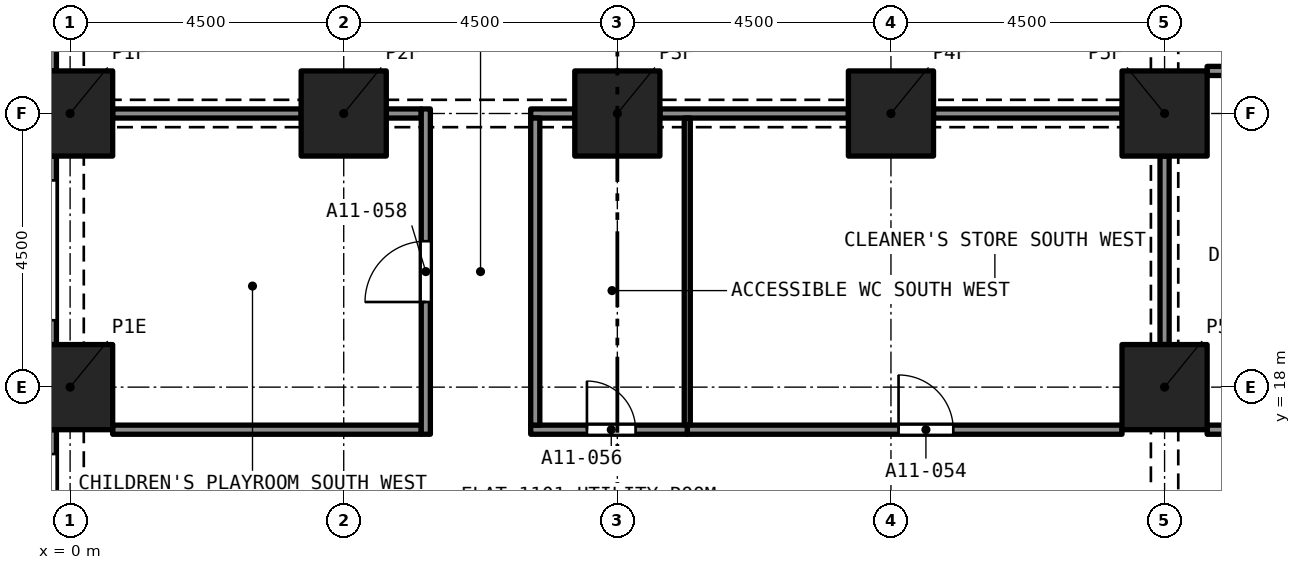
"""IFC4 building model, lengths in metres.
Left out: names, types, materials, properties, quantities, classifications, styles, units other than length and angle.
Written with IfcOpenShell. Run it as: python <this file> out.ifc"""

import sys

from ifc_helpers import new_model, si_unit, direction, frame, frame_2d, origin, origin_2d, place, context, subcontext, project, spatial, rectangle, extrude, element, fill, save


model = new_model("IFC4")
c1 = context("Model", 3, precision=1e-05, world=origin(), true_north=direction((0.0, 1.0)))
c2 = subcontext(c1, "Body", "Model", "MODEL_VIEW")
j1 = project(units=[si_unit("LENGTHUNIT", "METRE"), si_unit("PLANEANGLEUNIT", "RADIAN")], contexts=[c1])
p1 = place(None, origin())
s1 = spatial("IfcSite", under=j1, at=p1, CompositionType="ELEMENT")
p2 = place(p1, origin())
s2 = spatial("IfcBuilding", under=s1, at=p2, CompositionType="ELEMENT")
p3 = place(p2, frame((0.0, 0.0, 46.4)))
s3 = spatial("IfcBuildingStorey", under=s2, at=p3, CompositionType="ELEMENT", Elevation=46.4)
for number, where, z_axis, x_axis in (
    (1, (0.0, 18.0, 0.0), (0.0, 0.0, 1.0), (1.0, 0.0, 0.0)),
    (2, (18.0, 18.0, 0.0), (0.0, 0.0, 1.0), (1.0, 0.0, 0.0)),
    (3, (0.0, 22.5, 0.0), (0.0, 0.0, 1.0), (1.0, 0.0, 0.0)),
    (4, (4.5, 22.5, 0.0), (0.0, 0.0, 1.0), (1.0, 0.0, 0.0)),
    (5, (9.0, 22.5, 0.0), (0.0, 0.0, 1.0), (1.0, 0.0, 0.0)),
    (6, (13.5, 22.5, 0.0), (0.0, 0.0, 1.0), (1.0, 0.0, 0.0)),
    (7, (18.0, 22.5, 0.0), (0.0, 0.0, 1.0), (1.0, 0.0, 0.0)),
):
    element("IfcColumn", number, at=place(p3, frame(where, z_axis=z_axis, x_axis=x_axis)), inside=s3, PredefinedType="COLUMN", context=c2, shape_type="SweptSolid", body=[
        extrude(rectangle(XDim=1.4, YDim=1.4, at=origin_2d()), origin(), (0.0, 0.0, 1.0), 3.2),
    ])
p4 = place(p3, frame((-0.375, 23.2, 0.0), z_axis=(0.0, 0.0, 1.0), x_axis=(0.0, 1.0, 0.0)))
e8 = element("IfcWall", 8, at=p4, inside=s3, PredefinedType="SOLIDWALL", context=c2, shape_type="SweptSolid", body=[
    extrude(rectangle(XDim=3.1, YDim=0.3, at=frame_2d((1.55, 0.0))), origin(), (0.0, 0.0, 1.0), 3.2),
])
p5 = place(p4, frame((0.4, 0.0, 0.45)))
e9 = element("IfcOpeningElement", 9, at=p5, cuts=e8, PredefinedType="OPENING", context=c2, shape_type="SweptSolid", body=[
    extrude(rectangle(XDim=2.3, YDim=1.95, at=frame_2d((1.15, 0.975))), frame((0.0, 0.16, 0.0), z_axis=(0.0, -1.0, 0.0), x_axis=(1.0, 0.0, 0.0)), (0.0, 0.0, 1.0), 0.32),
])
p6 = place(p3, frame((-0.375, 18.7, 0.0), z_axis=(0.0, 0.0, 1.0), x_axis=(0.0, 1.0, 0.0)))
e10 = element("IfcWall", 10, at=p6, inside=s3, PredefinedType="SOLIDWALL", context=c2, shape_type="SweptSolid", body=[
    extrude(rectangle(XDim=3.1, YDim=0.3, at=frame_2d((1.55, 0.0))), origin(), (0.0, 0.0, 1.0), 3.2),
])
p7 = place(p6, frame((0.4, 0.0, 0.45)))
e11 = element("IfcOpeningElement", 11, at=p7, cuts=e10, PredefinedType="OPENING", context=c2, shape_type="SweptSolid", body=[
    extrude(rectangle(XDim=2.3, YDim=1.95, at=frame_2d((1.15, 0.975))), frame((0.0, 0.16, 0.0), z_axis=(0.0, -1.0, 0.0), x_axis=(1.0, 0.0, 0.0)), (0.0, 0.0, 1.0), 0.32),
])
p8 = place(p3, frame((-0.375, 14.2, 0.0), z_axis=(0.0, 0.0, 1.0), x_axis=(0.0, 1.0, 0.0)))
e12 = element("IfcWall", 12, at=p8, inside=s3, PredefinedType="SOLIDWALL", context=c2, shape_type="SweptSolid", body=[
    extrude(rectangle(XDim=3.1, YDim=0.3, at=frame_2d((1.55, 0.0))), origin(), (0.0, 0.0, 1.0), 3.2),
])
p9 = place(p8, frame((0.4, 0.0, 0.45)))
e13 = element("IfcOpeningElement", 13, at=p9, cuts=e12, PredefinedType="OPENING", context=c2, shape_type="SweptSolid", body=[
    extrude(rectangle(XDim=2.3, YDim=1.95, at=frame_2d((1.15, 0.975))), frame((0.0, 0.16, 0.0), z_axis=(0.0, -1.0, 0.0), x_axis=(1.0, 0.0, 0.0)), (0.0, 0.0, 1.0), 0.32),
])
p10 = place(p3, frame((18.7, 17.3, 0.0), z_axis=(0.0, 0.0, 1.0), x_axis=(1.0, 0.0, 0.0)))
e14 = element("IfcWall", 14, at=p10, inside=s3, PredefinedType="PARTITIONING", context=c2, shape_type="SweptSolid", body=[
    extrude(rectangle(XDim=5.075, YDim=0.15, at=frame_2d((2.538, 0.0))), origin(), (0.0, 0.0, 1.0), 2.75),
])
p11 = place(p3, frame((10.15, 17.3, 0.0), z_axis=(0.0, 0.0, 1.0), x_axis=(1.0, 0.0, 0.0)))
e15 = element("IfcWall", 15, at=p11, inside=s3, PredefinedType="PARTITIONING", context=c2, shape_type="SweptSolid", body=[
    extrude(rectangle(XDim=7.15, YDim=0.15, at=frame_2d((3.575, 0.0))), origin(), (0.0, 0.0, 1.0), 2.9),
])
p12 = place(p11, frame((3.475, 0.0, 0.0)))
e16 = element("IfcOpeningElement", 16, at=p12, cuts=e15, PredefinedType="OPENING", context=c2, shape_type="SweptSolid", body=[
    extrude(rectangle(XDim=0.9, YDim=2.1, at=frame_2d((0.45, 1.05))), frame((0.0, 0.085, 0.0), z_axis=(0.0, -1.0, 0.0), x_axis=(1.0, 0.0, 0.0)), (0.0, 0.0, 1.0), 0.17),
])
p13 = place(p3, frame((7.575, 17.3, 0.0), z_axis=(0.0, 0.0, 1.0), x_axis=(1.0, 0.0, 0.0)))
e17 = element("IfcWall", 17, at=p13, inside=s3, PredefinedType="PARTITIONING", context=c2, shape_type="SweptSolid", body=[
    extrude(rectangle(XDim=2.575, YDim=0.15, at=frame_2d((1.288, 0.0))), origin(), (0.0, 0.0, 1.0), 2.9),
])
p14 = place(p13, frame((0.925, 0.0, 0.0)))
e18 = element("IfcOpeningElement", 18, at=p14, cuts=e17, PredefinedType="OPENING", context=c2, shape_type="SweptSolid", body=[
    extrude(rectangle(XDim=0.8, YDim=2.1, at=frame_2d((0.4, 1.05))), frame((0.0, 0.085, 0.0), z_axis=(0.0, -1.0, 0.0), x_axis=(1.0, 0.0, 0.0)), (0.0, 0.0, 1.0), 0.17),
])
p15 = place(p3, frame((0.7, 17.3, 0.0), z_axis=(0.0, 0.0, 1.0), x_axis=(1.0, 0.0, 0.0)))
e19 = element("IfcWall", 19, at=p15, inside=s3, PredefinedType="PARTITIONING", context=c2, shape_type="SweptSolid", body=[
    extrude(rectangle(XDim=5.075, YDim=0.15, at=frame_2d((2.538, 0.0))), origin(), (0.0, 0.0, 1.0), 2.9),
])
p16 = place(p3, frame((18.7, 23.2, 0.0), z_axis=(0.0, 0.0, 1.0), x_axis=(1.0, 0.0, 0.0)))
e20 = element("IfcWall", 20, at=p16, inside=s3, PredefinedType="PARTITIONING", context=c2, shape_type="SweptSolid", body=[
    extrude(rectangle(XDim=5.075, YDim=0.15, at=frame_2d((2.538, 0.0))), origin(), (0.0, 0.0, 1.0), 2.75),
])
for number, where, z_axis, x_axis in (
    (21, (18.0, 18.7, 0.0), (0.0, 0.0, 1.0), (0.0, 1.0, 0.0)),
    (22, (14.2, 22.5, 0.0), (0.0, 0.0, 1.0), (1.0, 0.0, 0.0)),
    (23, (9.7, 22.5, 0.0), (0.0, 0.0, 1.0), (1.0, 0.0, 0.0)),
):
    element("IfcWall", number, at=place(p3, frame(where, z_axis=z_axis, x_axis=x_axis)), inside=s3, PredefinedType="PARTITIONING", context=c2, shape_type="SweptSolid", body=[
        extrude(rectangle(XDim=3.1, YDim=0.15, at=frame_2d((1.55, 0.0))), origin(), (0.0, 0.0, 1.0), 2.38),
    ])
p17 = place(p3, frame((7.575, 22.5, 0.0), z_axis=(0.0, 0.0, 1.0), x_axis=(1.0, 0.0, 0.0)))
e24 = element("IfcWall", 24, at=p17, inside=s3, PredefinedType="PARTITIONING", context=c2, shape_type="SweptSolid", body=[
    extrude(rectangle(XDim=0.725, YDim=0.15, at=frame_2d((0.363, 0.0))), origin(), (0.0, 0.0, 1.0), 2.38),
])
p18 = place(p3, frame((5.2, 22.5, 0.0), z_axis=(0.0, 0.0, 1.0), x_axis=(1.0, 0.0, 0.0)))
e25 = element("IfcWall", 25, at=p18, inside=s3, PredefinedType="PARTITIONING", context=c2, shape_type="SweptSolid", body=[
    extrude(rectangle(XDim=0.575, YDim=0.15, at=frame_2d((0.288, 0.0))), origin(), (0.0, 0.0, 1.0), 2.38),
])
p19 = place(p3, frame((0.7, 22.5, 0.0), z_axis=(0.0, 0.0, 1.0), x_axis=(1.0, 0.0, 0.0)))
e26 = element("IfcWall", 26, at=p19, inside=s3, PredefinedType="PARTITIONING", context=c2, shape_type="SweptSolid", body=[
    extrude(rectangle(XDim=3.1, YDim=0.15, at=frame_2d((1.55, 0.0))), origin(), (0.0, 0.0, 1.0), 2.38),
])
p20 = place(p3, frame((7.65, 17.375, 0.0), z_axis=(0.0, 0.0, 1.0), x_axis=(0.0, 1.0, 0.0)))
e27 = element("IfcWall", 27, at=p20, inside=s3, PredefinedType="PARTITIONING", context=c2, shape_type="SweptSolid", body=[
    extrude(rectangle(XDim=5.05, YDim=0.15, at=frame_2d((2.525, 0.0))), origin(), (0.0, 0.0, 1.0), 2.9),
])
p21 = place(p3, frame((5.85, 17.225, 0.0), z_axis=(0.0, 0.0, 1.0), x_axis=(0.0, 1.0, 0.0)))
e28 = element("IfcWall", 28, at=p21, inside=s3, PredefinedType="PARTITIONING", context=c2, shape_type="SweptSolid", body=[
    extrude(rectangle(XDim=5.35, YDim=0.15, at=frame_2d((2.675, 0.0))), origin(), (0.0, 0.0, 1.0), 2.9),
])
p22 = place(p21, frame((2.175, 0.0, 0.0)))
e29 = element("IfcOpeningElement", 29, at=p22, cuts=e28, PredefinedType="OPENING", context=c2, shape_type="SweptSolid", body=[
    extrude(rectangle(XDim=1.0, YDim=2.1, at=frame_2d((0.5, 1.05))), frame((0.0, 0.085, 0.0), z_axis=(0.0, -1.0, 0.0), x_axis=(1.0, 0.0, 0.0)), (0.0, 0.0, 1.0), 0.17),
])
p23 = place(p3, frame((10.15, 17.375, 0.0), z_axis=(0.0, 0.0, 1.0), x_axis=(0.0, 1.0, 0.0)))
e30 = element("IfcWall", 30, at=p23, inside=s3, PredefinedType="PARTITIONING", context=c2, shape_type="SweptSolid", body=[
    extrude(rectangle(XDim=5.05, YDim=0.1, at=frame_2d((2.525, 0.0))), origin(), (0.0, 0.0, 1.0), 2.9),
])
p24 = place(p12, origin())
e31 = element("IfcDoor", 31, at=p24, inside=s3, OperationType="SINGLE_SWING_RIGHT", PredefinedType="DOOR", context=c2, shape_type="SweptSolid", body=[
    extrude(rectangle(XDim=0.9, YDim=2.1, at=frame_2d((0.45, 1.05))), frame((0.0, 0.025, 0.0), z_axis=(0.0, -1.0, 0.0), x_axis=(1.0, 0.0, 0.0)), (0.0, 0.0, 1.0), 0.05),
])
fill(e16, e31)
p25 = place(p14, origin())
e32 = element("IfcDoor", 32, at=p25, inside=s3, OperationType="SINGLE_SWING_RIGHT", PredefinedType="DOOR", context=c2, shape_type="SweptSolid", body=[
    extrude(rectangle(XDim=0.8, YDim=2.1, at=frame_2d((0.4, 1.05))), frame((0.0, 0.025, 0.0), z_axis=(0.0, -1.0, 0.0), x_axis=(1.0, 0.0, 0.0)), (0.0, 0.0, 1.0), 0.05),
])
fill(e18, e32)
p26 = place(p22, origin())
e33 = element("IfcDoor", 33, at=p26, inside=s3, OperationType="SINGLE_SWING_LEFT", PredefinedType="DOOR", context=c2, shape_type="SweptSolid", body=[
    extrude(rectangle(XDim=1.0, YDim=2.1, at=frame_2d((0.5, 1.05))), frame((0.0, 0.025, 0.0), z_axis=(0.0, -1.0, 0.0), x_axis=(1.0, 0.0, 0.0)), (0.0, 0.0, 1.0), 0.05),
])
fill(e29, e33)
save(model, sys.argv[1])
